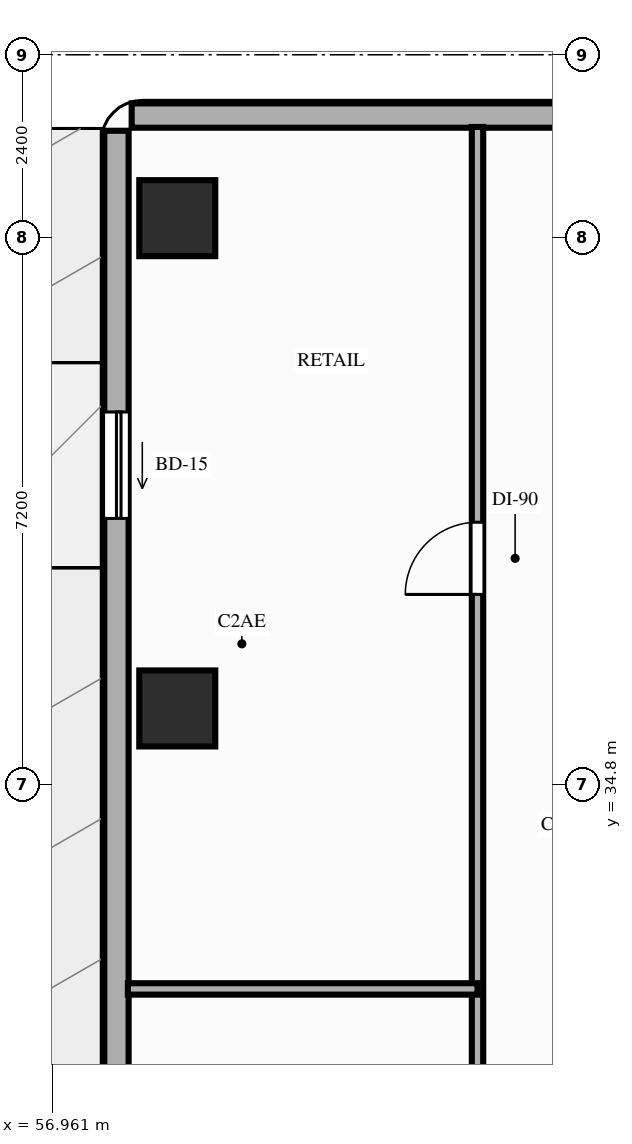
"""IFC4 building model, lengths in metres.
Left out: names, types, materials, properties, quantities, classifications, styles, units other than length and angle.
Written with IfcOpenShell. Run it as: python <this file> out.ifc"""

import sys

from ifc_helpers import new_model, si_unit, direction, frame, frame_2d, origin, origin_2d, place, context, subcontext, project, spatial, rectangle, extrude, element, fill, save


model = new_model("IFC4")
c1 = context("Model", 3, precision=1e-05, world=origin(), true_north=direction((0.0, 1.0)))
c2 = subcontext(c1, "Body", "Model", "MODEL_VIEW")
j1 = project(units=[si_unit("LENGTHUNIT", "METRE"), si_unit("PLANEANGLEUNIT", "RADIAN")], contexts=[c1])
p1 = place(None, origin())
s1 = spatial("IfcSite", under=j1, at=p1, CompositionType="ELEMENT")
p2 = place(p1, origin())
s2 = spatial("IfcBuilding", under=s1, at=p2, CompositionType="ELEMENT")
p3 = place(p2, frame((0.0, 0.0, 26.4)))
s3 = spatial("IfcBuildingStorey", under=s2, at=p3, CompositionType="ELEMENT", Elevation=26.4)
for number, where, z_axis, x_axis in (
    (1, (58.6, 35.8, -0.32), (0.0, 0.0, 1.0), (1.0, 0.0, 0.0)),
    (2, (58.6, 42.25, -0.32), (0.0, 0.0, 1.0), (1.0, 0.0, 0.0)),
):
    element("IfcColumn", number, at=place(p3, frame(where, z_axis=z_axis, x_axis=x_axis)), inside=s3, PredefinedType="COLUMN", context=c2, shape_type="SweptSolid", body=[
        extrude(rectangle(XDim=1.0, YDim=1.0, at=origin_2d()), origin(), (0.0, 0.0, 1.0), 4.12),
    ])
p4 = place(p3, frame((57.8, 43.4, 0.0), z_axis=(0.0, 0.0, 1.0), x_axis=(0.0, -1.0, 0.0)))
e3 = element("IfcWall", 3, at=p4, inside=s3, PredefinedType="STANDARD", context=c2, shape_type="SweptSolid", body=[
    extrude(rectangle(XDim=22.6, YDim=0.32, at=frame_2d((11.3, 0.0))), origin(), (0.0, 0.0, 1.0), 3.1),
])
p5 = place(p4, frame((3.7, 0.0, 0.0)))
e4 = element("IfcOpeningElement", 4, at=p5, cuts=e3, PredefinedType="OPENING", context=c2, shape_type="SweptSolid", body=[
    extrude(rectangle(XDim=1.4, YDim=2.1, at=frame_2d((0.7, 1.05))), frame((0.0, 0.17, 0.0), z_axis=(0.0, -1.0, 0.0), x_axis=(1.0, 0.0, 0.0)), (0.0, 0.0, 1.0), 0.34),
])
p6 = place(p3, frame((72.8, 43.6, 0.0), z_axis=(0.0, 0.0, 1.0), x_axis=(-1.0, 0.0, 0.0)))
e5 = element("IfcWall", 5, at=p6, inside=s3, PredefinedType="STANDARD", context=c2, shape_type="SweptSolid", body=[
    extrude(rectangle(XDim=14.8, YDim=0.32, at=frame_2d((7.4, 0.0))), origin(), (0.0, 0.0, 1.0), 3.62),
])
p7 = place(p3, frame((62.55, 20.75, 0.0), z_axis=(0.0, 0.0, 1.0), x_axis=(0.0, 1.0, 0.0)))
e6 = element("IfcWall", 6, at=p7, inside=s3, PredefinedType="PARTITIONING", context=c2, shape_type="SweptSolid", body=[
    extrude(rectangle(XDim=22.7, YDim=0.15, at=frame_2d((11.35, 0.0))), origin(), (0.0, 0.0, 1.0), 3.1),
])
p8 = place(p7, frame((1.05, 0.0, 0.0)))
e7 = element("IfcOpeningElement", 7, at=p8, cuts=e6, PredefinedType="OPENING", context=c2, shape_type="SweptSolid", body=[
    extrude(rectangle(XDim=0.85, YDim=2.1, at=frame_2d((0.425, 1.05))), frame((0.0, 0.085, 0.0), z_axis=(0.0, -1.0, 0.0), x_axis=(1.0, 0.0, 0.0)), (0.0, 0.0, 1.0), 0.17),
])
p9 = place(p7, frame((3.43, 0.0, 0.0)))
e8 = element("IfcOpeningElement", 8, at=p9, cuts=e6, PredefinedType="OPENING", context=c2, shape_type="SweptSolid", body=[
    extrude(rectangle(XDim=0.95, YDim=2.1, at=frame_2d((0.475, 1.05))), frame((0.0, 0.085, 0.0), z_axis=(0.0, -1.0, 0.0), x_axis=(1.0, 0.0, 0.0)), (0.0, 0.0, 1.0), 0.17),
])
p10 = place(p7, frame((8.15, 0.0, 0.0)))
e9 = element("IfcOpeningElement", 9, at=p10, cuts=e6, PredefinedType="OPENING", context=c2, shape_type="SweptSolid", body=[
    extrude(rectangle(XDim=0.95, YDim=2.15, at=frame_2d((0.475, 1.075))), frame((0.0, 0.085, 0.0), z_axis=(0.0, -1.0, 0.0), x_axis=(1.0, 0.0, 0.0)), (0.0, 0.0, 1.0), 0.17),
])
p11 = place(p7, frame((16.55, 0.0, 0.0)))
e10 = element("IfcOpeningElement", 10, at=p11, cuts=e6, PredefinedType="OPENING", context=c2, shape_type="SweptSolid", body=[
    extrude(rectangle(XDim=0.95, YDim=2.15, at=frame_2d((0.475, 1.075))), frame((0.0, 0.085, 0.0), z_axis=(0.0, -1.0, 0.0), x_axis=(1.0, 0.0, 0.0)), (0.0, 0.0, 1.0), 0.17),
])
p12 = place(p3, frame((57.95, 32.11, 0.0), z_axis=(0.0, 0.0, 1.0), x_axis=(1.0, 0.0, 0.0)))
e11 = element("IfcWall", 11, at=p12, inside=s3, PredefinedType="PARTITIONING", context=c2, shape_type="SweptSolid", body=[
    extrude(rectangle(XDim=4.6, YDim=0.15, at=frame_2d((2.3, 0.0))), origin(), (0.0, 0.0, 1.0), 3.1),
])
p13 = place(p5, origin())
e12 = element("IfcDoor", 12, at=p13, inside=s3, OperationType="SLIDING_TO_RIGHT", PredefinedType="DOOR", context=c2, shape_type="SweptSolid", body=[
    extrude(rectangle(XDim=1.4, YDim=2.1, at=frame_2d((0.7, 1.05))), frame((0.0, 0.025, 0.0), z_axis=(0.0, -1.0, 0.0), x_axis=(1.0, 0.0, 0.0)), (0.0, 0.0, 1.0), 0.05),
])
fill(e4, e12)
p14 = place(p11, origin())
e13 = element("IfcDoor", 13, at=p14, inside=s3, OperationType="SINGLE_SWING_LEFT", PredefinedType="DOOR", context=c2, shape_type="SweptSolid", body=[
    extrude(rectangle(XDim=0.95, YDim=2.15, at=frame_2d((0.475, 1.075))), frame((0.0, 0.025, 0.0), z_axis=(0.0, -1.0, 0.0), x_axis=(1.0, 0.0, 0.0)), (0.0, 0.0, 1.0), 0.05),
])
fill(e10, e13)
save(model, sys.argv[1])
